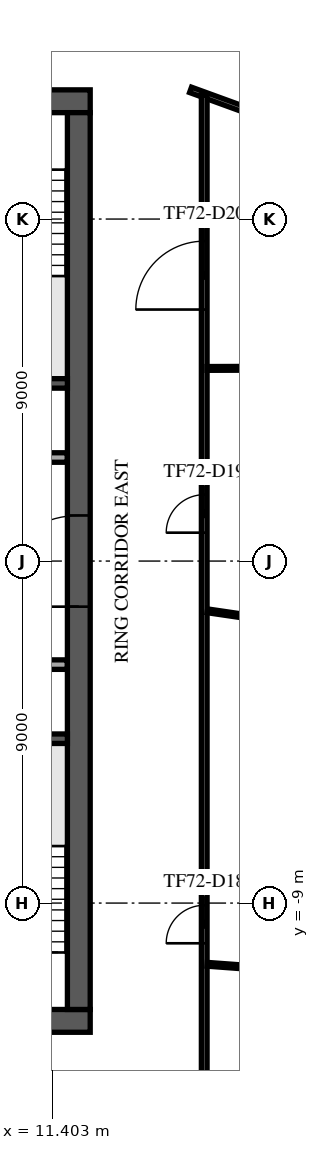
"""IFC4 building model, lengths in metres.
Left out: names, types, materials, properties, quantities, classifications, styles, units other than length and angle.
Written with IfcOpenShell. Run it as: python <this file> out.ifc"""

import sys

from ifc_helpers import new_model, si_unit, direction, frame, frame_2d, origin, place, context, subcontext, project, spatial, rectangle, extrude, element, fill, save


model = new_model("IFC4")
c1 = context("Model", 3, precision=1e-05, world=origin(), true_north=direction((0.0, 1.0)))
c2 = subcontext(c1, "Body", "Model", "MODEL_VIEW")
j1 = project(units=[si_unit("LENGTHUNIT", "METRE"), si_unit("PLANEANGLEUNIT", "RADIAN")], contexts=[c1])
p1 = place(None, origin())
s1 = spatial("IfcSite", under=j1, at=p1, CompositionType="ELEMENT")
p2 = place(p1, origin())
s2 = spatial("IfcBuilding", under=s1, at=p2, CompositionType="ELEMENT")
p3 = place(p2, frame((0.0, 0.0, 304.5)))
s3 = spatial("IfcBuildingStorey", under=s2, at=p3, CompositionType="ELEMENT", Elevation=304.5)
p4 = place(p3, frame((-12.4, 12.1, 0.0), z_axis=(0.0, 0.0, 1.0), x_axis=(1.0, 0.0, 0.0)))
e1 = element("IfcWall", 1, at=p4, inside=s3, PredefinedType="SHEAR", context=c2, shape_type="SweptSolid", body=[
    extrude(rectangle(XDim=24.8, YDim=0.6, at=frame_2d((12.4, 0.0))), origin(), (0.0, 0.0, 1.0), 3.65),
])
p5 = place(p4, frame((11.2, 0.0, 0.0)))
e2 = element("IfcOpeningElement", 2, at=p5, cuts=e1, PredefinedType="OPENING", context=c2, shape_type="SweptSolid", body=[
    extrude(rectangle(XDim=2.4, YDim=2.4, at=frame_2d((1.2, 1.2))), frame((0.0, 0.31, 0.0), z_axis=(0.0, -1.0, 0.0), x_axis=(1.0, 0.0, 0.0)), (0.0, 0.0, 1.0), 0.62),
])
p6 = place(p4, frame((22.025, 0.0, 0.0)))
e3 = element("IfcOpeningElement", 3, at=p6, cuts=e1, PredefinedType="OPENING", context=c2, shape_type="SweptSolid", body=[
    extrude(rectangle(XDim=1.2, YDim=2.1, at=frame_2d((0.6, 1.05))), frame((0.0, 0.31, 0.0), z_axis=(0.0, -1.0, 0.0), x_axis=(1.0, 0.0, 0.0)), (0.0, 0.0, 1.0), 0.62),
])
p7 = place(p4, frame((1.0, 0.0, 0.0)))
e4 = element("IfcOpeningElement", 4, at=p7, cuts=e1, PredefinedType="OPENING", context=c2, shape_type="SweptSolid", body=[
    extrude(rectangle(XDim=1.0, YDim=2.1, at=frame_2d((0.5, 1.05))), frame((0.0, 0.31, 0.0), z_axis=(0.0, -1.0, 0.0), x_axis=(1.0, 0.0, 0.0)), (0.0, 0.0, 1.0), 0.62),
])
p8 = place(p3, frame((-12.4, -12.1, 0.0), z_axis=(0.0, 0.0, 1.0), x_axis=(1.0, 0.0, 0.0)))
e5 = element("IfcWall", 5, at=p8, inside=s3, PredefinedType="SHEAR", context=c2, shape_type="SweptSolid", body=[
    extrude(rectangle(XDim=24.8, YDim=0.6, at=frame_2d((12.4, 0.0))), origin(), (0.0, 0.0, 1.0), 3.65),
])
p9 = place(p8, frame((7.3, 0.0, 0.0)))
e6 = element("IfcOpeningElement", 6, at=p9, cuts=e5, PredefinedType="OPENING", context=c2, shape_type="SweptSolid", body=[
    extrude(rectangle(XDim=2.0, YDim=2.1, at=frame_2d((1.0, 1.05))), frame((0.0, 0.31, 0.0), z_axis=(0.0, -1.0, 0.0), x_axis=(1.0, 0.0, 0.0)), (0.0, 0.0, 1.0), 0.62),
])
p10 = place(p8, frame((17.425, 0.0, 0.0)))
e7 = element("IfcOpeningElement", 7, at=p10, cuts=e5, PredefinedType="OPENING", context=c2, shape_type="SweptSolid", body=[
    extrude(rectangle(XDim=1.2, YDim=2.1, at=frame_2d((0.6, 1.05))), frame((0.0, 0.31, 0.0), z_axis=(0.0, -1.0, 0.0), x_axis=(1.0, 0.0, 0.0)), (0.0, 0.0, 1.0), 0.62),
])
p11 = place(p8, frame((1.575, 0.0, 0.0)))
e8 = element("IfcOpeningElement", 8, at=p11, cuts=e5, PredefinedType="OPENING", context=c2, shape_type="SweptSolid", body=[
    extrude(rectangle(XDim=1.2, YDim=2.1, at=frame_2d((0.6, 1.05))), frame((0.0, 0.31, 0.0), z_axis=(0.0, -1.0, 0.0), x_axis=(1.0, 0.0, 0.0)), (0.0, 0.0, 1.0), 0.62),
])
p12 = place(p8, frame((22.025, 0.0, 0.0)))
e9 = element("IfcOpeningElement", 9, at=p12, cuts=e5, PredefinedType="OPENING", context=c2, shape_type="SweptSolid", body=[
    extrude(rectangle(XDim=1.2, YDim=2.1, at=frame_2d((0.6, 1.05))), frame((0.0, 0.31, 0.0), z_axis=(0.0, -1.0, 0.0), x_axis=(1.0, 0.0, 0.0)), (0.0, 0.0, 1.0), 0.62),
])
p13 = place(p3, frame((12.1, -11.8, 0.0), z_axis=(0.0, 0.0, 1.0), x_axis=(0.0, 1.0, 0.0)))
e10 = element("IfcWall", 10, at=p13, inside=s3, PredefinedType="SHEAR", context=c2, shape_type="SweptSolid", body=[
    extrude(rectangle(XDim=23.6, YDim=0.6, at=frame_2d((11.8, 0.0))), origin(), (0.0, 0.0, 1.0), 3.65),
])
p14 = place(p13, frame((10.6, 0.0, 0.0)))
e11 = element("IfcOpeningElement", 11, at=p14, cuts=e10, PredefinedType="OPENING", context=c2, shape_type="SweptSolid", body=[
    extrude(rectangle(XDim=2.4, YDim=2.4, at=frame_2d((1.2, 1.2))), frame((0.0, 0.31, 0.0), z_axis=(0.0, -1.0, 0.0), x_axis=(1.0, 0.0, 0.0)), (0.0, 0.0, 1.0), 0.62),
])
for number, where, z_axis, x_axis in (
    (12, (8.65, 4.675, 0.0), (0.0, 0.0, 1.0), (1.0, 0.0, 0.0)),
    (13, (8.65, -4.675, 0.0), (0.0, 0.0, 1.0), (1.0, 0.0, 0.0)),
):
    element("IfcWall", number, at=place(p3, frame(where, z_axis=z_axis, x_axis=x_axis)), inside=s3, PredefinedType="SOLIDWALL", context=c2, shape_type="SweptSolid", body=[
        extrude(rectangle(XDim=3.15, YDim=0.25, at=frame_2d((1.575, 0.0))), origin(), (0.0, 0.0, 1.0), 3.65),
    ])
p15 = place(p3, frame((5.63, -2.725, 0.0), z_axis=(0.0, 0.0, 1.0), x_axis=(1.0, 0.0, 0.0)))
e14 = element("IfcWall", 14, at=p15, inside=s3, PredefinedType="PARTITIONING", context=c2, shape_type="SweptSolid", body=[
    extrude(rectangle(XDim=6.165, YDim=0.25, at=frame_2d((3.083, 0.0))), origin(), (0.0, 0.0, 1.0), 3.65),
])
p16 = place(p15, frame((0.745, 0.0, 0.0)))
e15 = element("IfcOpeningElement", 15, at=p16, cuts=e14, PredefinedType="OPENING", context=c2, shape_type="SweptSolid", body=[
    extrude(rectangle(XDim=1.0, YDim=2.1, at=frame_2d((0.5, 1.05))), frame((0.0, 0.135, 0.0), z_axis=(0.0, -1.0, 0.0), x_axis=(1.0, 0.0, 0.0)), (0.0, 0.0, 1.0), 0.27),
])
p17 = place(p15, frame((3.92, 0.0, 0.0)))
e16 = element("IfcOpeningElement", 16, at=p17, cuts=e14, PredefinedType="OPENING", context=c2, shape_type="SweptSolid", body=[
    extrude(rectangle(XDim=0.9, YDim=2.1, at=frame_2d((0.45, 1.05))), frame((0.0, 0.135, 0.0), z_axis=(0.0, -1.0, 0.0), x_axis=(1.0, 0.0, 0.0)), (0.0, 0.0, 1.0), 0.27),
])
p18 = place(p3, frame((-11.795, 2.725, 0.0), z_axis=(0.0, 0.0, 1.0), x_axis=(1.0, 0.0, 0.0)))
e17 = element("IfcWall", 17, at=p18, inside=s3, PredefinedType="PARTITIONING", context=c2, shape_type="SweptSolid", body=[
    extrude(rectangle(XDim=23.59, YDim=0.25, at=frame_2d((11.795, 0.0))), origin(), (0.0, 0.0, 1.0), 3.65),
])
p19 = place(p18, frame((21.345, 0.0, 0.0)))
e18 = element("IfcOpeningElement", 18, at=p19, cuts=e17, PredefinedType="OPENING", context=c2, shape_type="SweptSolid", body=[
    extrude(rectangle(XDim=0.9, YDim=2.1, at=frame_2d((0.45, 1.05))), frame((0.0, 0.135, 0.0), z_axis=(0.0, -1.0, 0.0), x_axis=(1.0, 0.0, 0.0)), (0.0, 0.0, 1.0), 0.27),
])
p20 = place(p18, frame((1.345, 0.0, 0.0)))
e19 = element("IfcOpeningElement", 19, at=p20, cuts=e17, PredefinedType="OPENING", context=c2, shape_type="SweptSolid", body=[
    extrude(rectangle(XDim=0.9, YDim=2.1, at=frame_2d((0.45, 1.05))), frame((0.0, 0.135, 0.0), z_axis=(0.0, -1.0, 0.0), x_axis=(1.0, 0.0, 0.0)), (0.0, 0.0, 1.0), 0.27),
])
p21 = place(p18, frame((4.32, 0.0, 0.0)))
e20 = element("IfcOpeningElement", 20, at=p21, cuts=e17, PredefinedType="OPENING", context=c2, shape_type="SweptSolid", body=[
    extrude(rectangle(XDim=1.2, YDim=2.1, at=frame_2d((0.6, 1.05))), frame((0.0, 0.135, 0.0), z_axis=(0.0, -1.0, 0.0), x_axis=(1.0, 0.0, 0.0)), (0.0, 0.0, 1.0), 0.27),
])
p22 = place(p18, frame((15.42, 0.0, 0.0)))
e21 = element("IfcOpeningElement", 21, at=p22, cuts=e17, PredefinedType="OPENING", context=c2, shape_type="SweptSolid", body=[
    extrude(rectangle(XDim=1.0, YDim=2.1, at=frame_2d((0.5, 1.05))), frame((0.0, 0.135, 0.0), z_axis=(0.0, -1.0, 0.0), x_axis=(1.0, 0.0, 0.0)), (0.0, 0.0, 1.0), 0.27),
])
p23 = place(p3, frame((-24.679, -11.445, 0.0), z_axis=(0.0, 0.0, 1.0), x_axis=(0.939685239834, -0.342040421645, 0.0)))
e22 = element("IfcWall", 22, at=p23, inside=s3, PredefinedType="PARTITIONING", context=c2, shape_type="SweptSolid", body=[
    extrude(rectangle(XDim=38.628, YDim=0.15, at=frame_2d((19.314, 0.0))), origin(), (0.0, 0.0, 1.0), 3.25),
])
p24 = place(p23, frame((8.764, 0.0, 0.0)))
e23 = element("IfcOpeningElement", 23, at=p24, cuts=e22, PredefinedType="OPENING", context=c2, shape_type="SweptSolid", body=[
    extrude(rectangle(XDim=1.0, YDim=2.1, at=frame_2d((0.5, 1.05))), frame((0.0, 0.085, 0.0), z_axis=(0.0, -1.0, 0.0), x_axis=(1.0, 0.0, 0.0)), (0.0, 0.0, 1.0), 0.17),
])
p25 = place(p23, frame((19.503, 0.0, 0.0)))
e24 = element("IfcOpeningElement", 24, at=p25, cuts=e22, PredefinedType="OPENING", context=c2, shape_type="SweptSolid", body=[
    extrude(rectangle(XDim=1.0, YDim=2.1, at=frame_2d((0.5, 1.05))), frame((0.0, 0.085, 0.0), z_axis=(0.0, -1.0, 0.0), x_axis=(1.0, 0.0, 0.0)), (0.0, 0.0, 1.0), 0.17),
])
p26 = place(p23, frame((29.163, 0.0, 0.0)))
e25 = element("IfcOpeningElement", 25, at=p26, cuts=e22, PredefinedType="OPENING", context=c2, shape_type="SweptSolid", body=[
    extrude(rectangle(XDim=1.0, YDim=2.1, at=frame_2d((0.5, 1.05))), frame((0.0, 0.085, 0.0), z_axis=(0.0, -1.0, 0.0), x_axis=(1.0, 0.0, 0.0)), (0.0, 0.0, 1.0), 0.17),
])
p27 = place(p3, frame((-11.549, 24.631, 0.0), z_axis=(0.0, 0.0, 1.0), x_axis=(0.939685979246, -0.342038390256, 0.0)))
e26 = element("IfcWall", 26, at=p27, inside=s3, PredefinedType="PARTITIONING", context=c2, shape_type="SweptSolid", body=[
    extrude(rectangle(XDim=38.628, YDim=0.15, at=frame_2d((19.314, 0.0))), origin(), (0.0, 0.0, 1.0), 3.25),
])
p28 = place(p27, frame((5.05, 0.0, 0.0)))
e27 = element("IfcOpeningElement", 27, at=p28, cuts=e26, PredefinedType="OPENING", context=c2, shape_type="SweptSolid", body=[
    extrude(rectangle(XDim=1.8, YDim=2.1, at=frame_2d((0.9, 1.05))), frame((0.0, 0.085, 0.0), z_axis=(0.0, -1.0, 0.0), x_axis=(1.0, 0.0, 0.0)), (0.0, 0.0, 1.0), 0.17),
])
p29 = place(p27, frame((10.046, 0.0, 0.0)))
e28 = element("IfcOpeningElement", 28, at=p29, cuts=e26, PredefinedType="OPENING", context=c2, shape_type="SweptSolid", body=[
    extrude(rectangle(XDim=1.0, YDim=2.1, at=frame_2d((0.5, 1.05))), frame((0.0, 0.085, 0.0), z_axis=(0.0, -1.0, 0.0), x_axis=(1.0, 0.0, 0.0)), (0.0, 0.0, 1.0), 0.17),
])
p30 = place(p27, frame((15.561, 0.0, 0.0)))
e29 = element("IfcOpeningElement", 29, at=p30, cuts=e26, PredefinedType="OPENING", context=c2, shape_type="SweptSolid", body=[
    extrude(rectangle(XDim=1.0, YDim=2.1, at=frame_2d((0.5, 1.05))), frame((0.0, 0.085, 0.0), z_axis=(0.0, -1.0, 0.0), x_axis=(1.0, 0.0, 0.0)), (0.0, 0.0, 1.0), 0.17),
])
p31 = place(p27, frame((27.042, 0.0, 0.0)))
e30 = element("IfcOpeningElement", 30, at=p31, cuts=e26, PredefinedType="OPENING", context=c2, shape_type="SweptSolid", body=[
    extrude(rectangle(XDim=1.0, YDim=2.1, at=frame_2d((0.5, 1.05))), frame((0.0, 0.085, 0.0), z_axis=(0.0, -1.0, 0.0), x_axis=(1.0, 0.0, 0.0)), (0.0, 0.0, 1.0), 0.17),
])
p32 = place(p27, frame((35.506, 0.0, 0.0)))
e31 = element("IfcOpeningElement", 31, at=p32, cuts=e26, PredefinedType="OPENING", context=c2, shape_type="SweptSolid", body=[
    extrude(rectangle(XDim=1.0, YDim=2.1, at=frame_2d((0.5, 1.05))), frame((0.0, 0.085, 0.0), z_axis=(0.0, -1.0, 0.0), x_axis=(1.0, 0.0, 0.0)), (0.0, 0.0, 1.0), 0.17),
])
p33 = place(p3, frame((15.04, 12.4, 0.0), z_axis=(0.0, 0.0, 1.0), x_axis=(0.939674306664, -0.34207045677, 0.0)))
e32 = element("IfcWall", 32, at=p33, inside=s3, PredefinedType="PARTITIONING", context=c2, shape_type="SweptSolid", body=[
    extrude(rectangle(XDim=9.459, YDim=0.15, at=frame_2d((4.73, 0.0))), origin(), (0.0, 0.0, 1.0), 3.25),
])
p34 = place(p3, frame((15.4, -15.325, 0.0), z_axis=(0.0, 0.0, 1.0), x_axis=(0.0, 1.0, 0.0)))
e33 = element("IfcWall", 33, at=p34, inside=s3, PredefinedType="PARTITIONING", context=c2, shape_type="SweptSolid", body=[
    extrude(rectangle(XDim=27.593, YDim=0.15, at=frame_2d((13.796, 0.0))), origin(), (0.0, 0.0, 1.0), 3.25),
])
p35 = place(p34, frame((5.267, 0.0, 0.0)))
e34 = element("IfcOpeningElement", 34, at=p35, cuts=e33, PredefinedType="OPENING", context=c2, shape_type="SweptSolid", body=[
    extrude(rectangle(XDim=1.0, YDim=2.1, at=frame_2d((0.5, 1.05))), frame((0.0, 0.085, 0.0), z_axis=(0.0, -1.0, 0.0), x_axis=(1.0, 0.0, 0.0)), (0.0, 0.0, 1.0), 0.17),
])
p36 = place(p34, frame((16.072, 0.0, 0.0)))
e35 = element("IfcOpeningElement", 35, at=p36, cuts=e33, PredefinedType="OPENING", context=c2, shape_type="SweptSolid", body=[
    extrude(rectangle(XDim=1.0, YDim=2.1, at=frame_2d((0.5, 1.05))), frame((0.0, 0.085, 0.0), z_axis=(0.0, -1.0, 0.0), x_axis=(1.0, 0.0, 0.0)), (0.0, 0.0, 1.0), 0.17),
])
p37 = place(p34, frame((21.944, 0.0, 0.0)))
e36 = element("IfcOpeningElement", 36, at=p37, cuts=e33, PredefinedType="OPENING", context=c2, shape_type="SweptSolid", body=[
    extrude(rectangle(XDim=1.8, YDim=2.1, at=frame_2d((0.9, 1.05))), frame((0.0, 0.085, 0.0), z_axis=(0.0, -1.0, 0.0), x_axis=(1.0, 0.0, 0.0)), (0.0, 0.0, 1.0), 0.17),
])
p38 = place(p3, frame((15.479, -10.611, 0.0), z_axis=(0.0, 0.0, 1.0), x_axis=(0.997294736008, -0.073506527135, 0.0)))
e37 = element("IfcWall", 37, at=p38, inside=s3, PredefinedType="PARTITIONING", context=c2, shape_type="SweptSolid", body=[
    extrude(rectangle(XDim=8.546, YDim=0.1, at=frame_2d((4.273, 0.0))), origin(), (0.0, 0.0, 1.0), 3.05),
])
p39 = place(p3, frame((15.482, -1.309, 0.0), z_axis=(0.0, 0.0, 1.0), x_axis=(0.989423142791, -0.145058072884, 0.0)))
e38 = element("IfcWall", 38, at=p39, inside=s3, PredefinedType="PARTITIONING", context=c2, shape_type="SweptSolid", body=[
    extrude(rectangle(XDim=11.642, YDim=0.1, at=frame_2d((5.821, 0.0))), origin(), (0.0, 0.0, 1.0), 3.05),
])
p40 = place(p3, frame((15.475, 5.069, 0.0), z_axis=(0.0, 0.0, 1.0), x_axis=(0.999996133827, 0.00278070684, 0.0)))
e39 = element("IfcWall", 39, at=p40, inside=s3, PredefinedType="PARTITIONING", context=c2, shape_type="SweptSolid", body=[
    extrude(rectangle(XDim=11.765, YDim=0.1, at=frame_2d((5.882, 0.0))), origin(), (0.0, 0.0, 1.0), 3.13),
])
p41 = place(p14, origin())
e40 = element("IfcDoor", 40, at=p41, inside=s3, OperationType="SINGLE_SWING_LEFT", PredefinedType="DOOR", context=c2, shape_type="SweptSolid", body=[
    extrude(rectangle(XDim=2.4, YDim=2.4, at=frame_2d((1.2, 1.2))), frame((0.0, 0.025, 0.0), z_axis=(0.0, -1.0, 0.0), x_axis=(1.0, 0.0, 0.0)), (0.0, 0.0, 1.0), 0.05),
])
fill(e11, e40)
p42 = place(p35, frame((1.0, 0.0, 0.0), z_axis=(0.0, 0.0, 1.0), x_axis=(-1.0, 0.0, 0.0)))
e41 = element("IfcDoor", 41, at=p42, inside=s3, OperationType="SINGLE_SWING_RIGHT", PredefinedType="DOOR", context=c2, shape_type="SweptSolid", body=[
    extrude(rectangle(XDim=1.0, YDim=2.1, at=frame_2d((0.5, 1.05))), frame((0.0, 0.025, 0.0), z_axis=(0.0, -1.0, 0.0), x_axis=(1.0, 0.0, 0.0)), (0.0, 0.0, 1.0), 0.05),
])
fill(e34, e41)
p43 = place(p36, frame((1.0, 0.0, 0.0), z_axis=(0.0, 0.0, 1.0), x_axis=(-1.0, 0.0, 0.0)))
e42 = element("IfcDoor", 42, at=p43, inside=s3, OperationType="SINGLE_SWING_RIGHT", PredefinedType="DOOR", context=c2, shape_type="SweptSolid", body=[
    extrude(rectangle(XDim=1.0, YDim=2.1, at=frame_2d((0.5, 1.05))), frame((0.0, 0.025, 0.0), z_axis=(0.0, -1.0, 0.0), x_axis=(1.0, 0.0, 0.0)), (0.0, 0.0, 1.0), 0.05),
])
fill(e35, e42)
p44 = place(p37, frame((1.8, 0.0, 0.0), z_axis=(0.0, 0.0, 1.0), x_axis=(-1.0, 0.0, 0.0)))
e43 = element("IfcDoor", 43, at=p44, inside=s3, OperationType="DOUBLE_DOOR_SINGLE_SWING", PredefinedType="DOOR", context=c2, shape_type="SweptSolid", body=[
    extrude(rectangle(XDim=1.8, YDim=2.1, at=frame_2d((0.9, 1.05))), frame((0.0, 0.025, 0.0), z_axis=(0.0, -1.0, 0.0), x_axis=(1.0, 0.0, 0.0)), (0.0, 0.0, 1.0), 0.05),
])
fill(e36, e43)
save(model, sys.argv[1])
